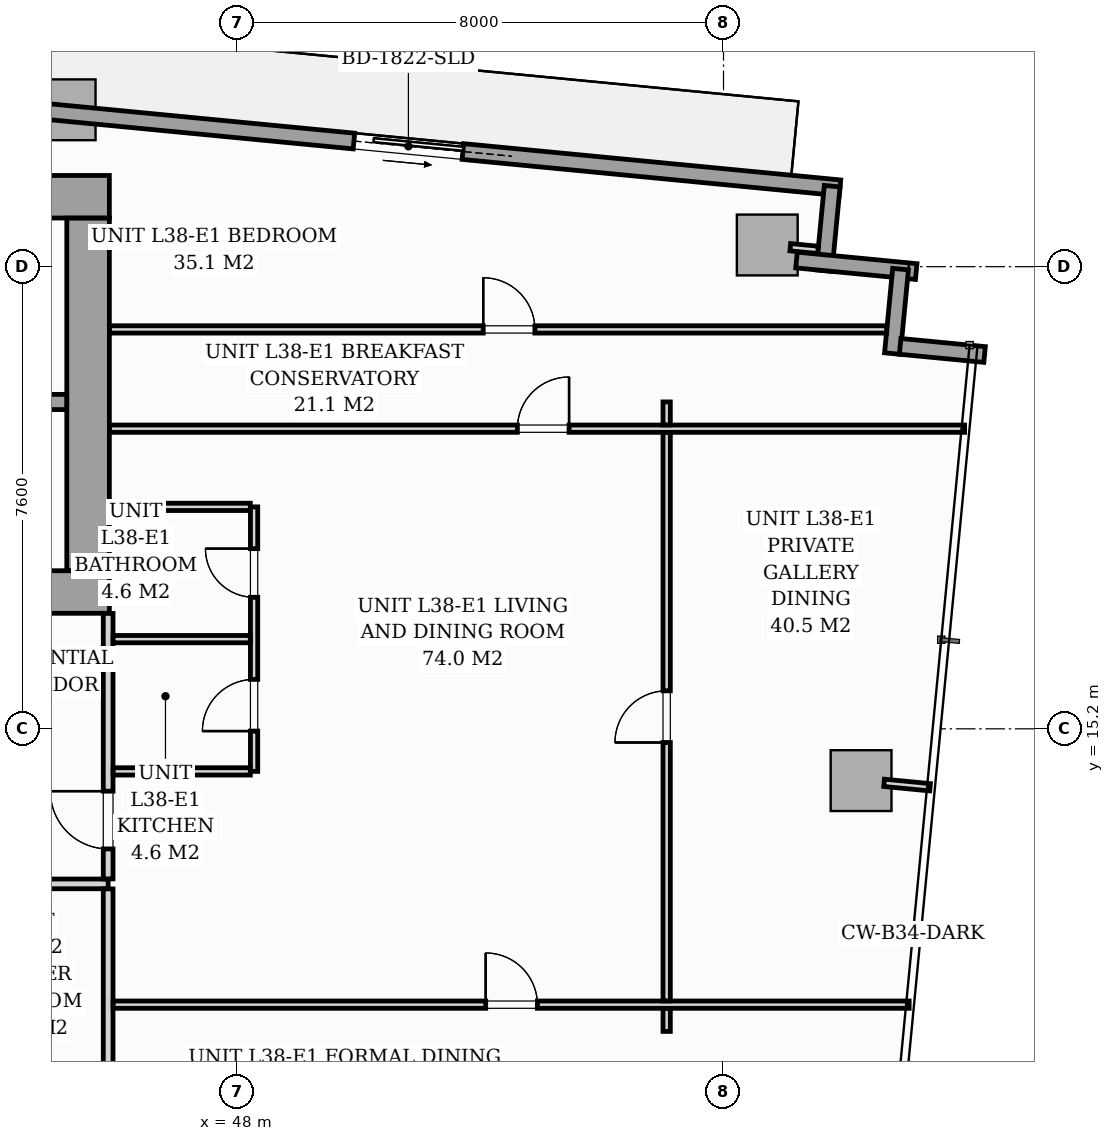
"""IFC4 building model, lengths in metres.
Left out: names, types, materials, properties, quantities, classifications, styles, units other than length and angle.
Written with IfcOpenShell. Run it as: python <this file> out.ifc"""

import sys

from ifc_helpers import new_model, si_unit, direction, frame, frame_2d, origin, origin_2d, place, context, subcontext, project, spatial, rectangle, i_section, extrude, source, transform, mapped, element, fill, save


model = new_model("IFC4")
c1 = context("Model", 3, precision=1e-05, world=origin(), true_north=direction((0.0, 1.0)))
c2 = subcontext(c1, "Body", "Model", "MODEL_VIEW")
j1 = project(units=[si_unit("LENGTHUNIT", "METRE"), si_unit("PLANEANGLEUNIT", "RADIAN")], contexts=[c1])
p1 = place(None, origin())
s1 = spatial("IfcSite", under=j1, at=p1, CompositionType="ELEMENT")
p2 = place(p1, origin())
s2 = spatial("IfcBuilding", under=s1, at=p2, CompositionType="ELEMENT")
p3 = place(p2, frame((0.0, 0.0, 134.2)))
s3 = spatial("IfcBuildingStorey", under=s2, at=p3, CompositionType="ELEMENT", Elevation=134.2)
m1 = source(origin(), c2, "Body", "SweptSolid", [
    extrude(i_section(OverallWidth=0.421, OverallDepth=0.465, WebThickness=0.045, FlangeThickness=0.073, FilletRadius=0.018, at=origin_2d()), origin(), (0.0, 0.0, 1.0), 3.196),
])
for number, where, z_axis, x_axis in (
    (1, (45.6, 17.4, 0.002), (0.0, 0.0, 1.0), (1.0, 0.0, 0.0)),
    (2, (45.6, 24.0, 0.002), (0.0, 0.0, 1.0), (1.0, 0.0, 0.0)),
):
    element("IfcColumn", number, at=place(p3, frame(where, z_axis=z_axis, x_axis=x_axis)), inside=s3, PredefinedType="PILASTER", context=c2, shape_type="MappedRepresentation", body=[
        mapped(m1, transform((0.0, 0.0, 0.0), scale=1.0)),
    ])
m2 = source(origin(), c2, "Body", "SweptSolid", [
    extrude(rectangle(XDim=1.0, YDim=1.0, at=origin_2d()), origin(), (0.0, 0.0, 1.0), 3.196),
])
for number, where, z_axis, x_axis in (
    (3, (45.173, 25.38, 0.002), (0.0, 0.0, 1.0), (0.995, -0.096, 0.0)),
    (4, (56.719, 23.157, 0.002), (0.0, 0.0, 1.0), (0.995, -0.096, 0.0)),
    (5, (58.262, 14.348, 0.002), (0.0, 0.0, 1.0), (0.995, -0.096, 0.0)),
):
    element("IfcColumn", number, at=place(p3, frame(where, z_axis=z_axis, x_axis=x_axis)), inside=s3, PredefinedType="COLUMN", context=c2, shape_type="MappedRepresentation", body=[
        mapped(m2, transform((0.0, 0.0, 0.0), scale=1.0)),
    ])
p4 = place(p3, frame((40.983, 25.727, 0.0), z_axis=(0.0, 0.0, 1.0), x_axis=(0.995395844771, -0.095849424686, 0.0)))
e6 = element("IfcWall", 6, at=p4, inside=s3, PredefinedType="STANDARD", context=c2, shape_type="SweptSolid", body=[
    extrude(rectangle(XDim=17.01, YDim=0.26, at=frame_2d((8.505, 0.0))), origin(), (0.0, 0.0, 1.0), 2.94),
])
p5 = place(p4, frame((8.98, 0.0, 0.0)))
e7 = element("IfcOpeningElement", 7, at=p5, cuts=e6, PredefinedType="OPENING", context=c2, shape_type="SweptSolid", body=[
    extrude(rectangle(XDim=1.8, YDim=2.06, at=frame_2d((0.9, 1.03))), frame((0.0, 0.14, 0.0), z_axis=(0.0, -1.0, 0.0), x_axis=(1.0, 0.0, 0.0)), (0.0, 0.0, 1.0), 0.28),
])
p6 = place(p4, frame((0.7, 0.0, 0.65)))
e8 = element("IfcOpeningElement", 8, at=p6, cuts=e6, PredefinedType="OPENING", context=c2, shape_type="SweptSolid", body=[
    extrude(rectangle(XDim=1.6, YDim=1.5, at=frame_2d((0.8, 0.75))), frame((0.0, 0.14, 0.0), z_axis=(0.0, -1.0, 0.0), x_axis=(1.0, 0.0, 0.0)), (0.0, 0.0, 1.0), 0.28),
])
p7 = place(p3, frame((57.787, 24.124, 0.0), z_axis=(0.0, 0.0, 1.0), x_axis=(-0.095915846097, -0.995389446633, 0.0)))
e9 = element("IfcWall", 9, at=p7, inside=s3, PredefinedType="STANDARD", context=c2, shape_type="SweptSolid", body=[
    extrude(rectangle(XDim=1.395, YDim=0.26, at=frame_2d((0.697, 0.0))), origin(), (0.0, 0.0, 1.0), 2.94),
])
p8 = place(p3, frame((57.2, 22.909, 0.0), z_axis=(0.0, 0.0, 1.0), x_axis=(0.995401789159, -0.095787672171, 0.0)))
e10 = element("IfcWall", 10, at=p8, inside=s3, PredefinedType="STANDARD", context=c2, shape_type="SweptSolid", body=[
    extrude(rectangle(XDim=1.978, YDim=0.26, at=frame_2d((0.989, 0.0))), origin(), (0.0, 0.0, 1.0), 2.94),
])
for number, where, z_axis, x_axis in (
    (11, (58.912, 22.76, 0.0), (0.0, 0.0, 1.0), (-0.096, -0.995, 0.0)),
    (12, (58.905, 21.49, 0.0), (0.0, 0.0, 1.0), (0.995, -0.096, 0.0)),
):
    element("IfcWall", number, at=place(p3, frame(where, z_axis=z_axis, x_axis=x_axis)), inside=s3, PredefinedType="STANDARD", context=c2, shape_type="SweptSolid", body=[
        extrude(rectangle(XDim=1.395, YDim=0.26, at=frame_2d((0.698, 0.0))), origin(), (0.0, 0.0, 1.0), 2.94),
    ])
p9 = place(p3, frame((26.1, 17.45, 0.0), z_axis=(0.0, 0.0, 1.0), x_axis=(1.0, 0.0, 0.0)))
e13 = element("IfcWall", 13, at=p9, inside=s3, PredefinedType="SHEAR", context=c2, shape_type="SweptSolid", body=[
    extrude(rectangle(XDim=19.8, YDim=0.7, at=frame_2d((9.9, 0.0))), origin(), (0.0, 0.0, 1.0), 3.2),
])
p10 = place(p9, frame((1.05, 0.0, 0.0)))
e14 = element("IfcOpeningElement", 14, at=p10, cuts=e13, PredefinedType="OPENING", context=c2, shape_type="SweptSolid", body=[
    extrude(rectangle(XDim=0.95, YDim=2.06, at=frame_2d((0.475, 1.03))), frame((0.0, 0.36, 0.0), z_axis=(0.0, -1.0, 0.0), x_axis=(1.0, 0.0, 0.0)), (0.0, 0.0, 1.0), 0.72),
])
p11 = place(p9, frame((9.48, 0.0, 0.0)))
e15 = element("IfcOpeningElement", 15, at=p11, cuts=e13, PredefinedType="OPENING", context=c2, shape_type="SweptSolid", body=[
    extrude(rectangle(XDim=0.85, YDim=2.0, at=frame_2d((0.425, 1.0))), frame((0.0, 0.36, 0.0), z_axis=(0.0, -1.0, 0.0), x_axis=(1.0, 0.0, 0.0)), (0.0, 0.0, 1.0), 0.72),
])
p12 = place(p9, frame((17.65, 0.0, 0.0)))
e16 = element("IfcOpeningElement", 16, at=p12, cuts=e13, PredefinedType="OPENING", context=c2, shape_type="SweptSolid", body=[
    extrude(rectangle(XDim=0.95, YDim=2.06, at=frame_2d((0.475, 1.03))), frame((0.0, 0.36, 0.0), z_axis=(0.0, -1.0, 0.0), x_axis=(1.0, 0.0, 0.0)), (0.0, 0.0, 1.0), 0.72),
])
p13 = place(p3, frame((26.1, 23.95, 0.0), z_axis=(0.0, 0.0, 1.0), x_axis=(1.0, 0.0, 0.0)))
e17 = element("IfcWall", 17, at=p13, inside=s3, PredefinedType="SHEAR", context=c2, shape_type="SweptSolid", body=[
    extrude(rectangle(XDim=19.8, YDim=0.7, at=frame_2d((9.9, 0.0))), origin(), (0.0, 0.0, 1.0), 3.2),
])
p14 = place(p3, frame((45.55, 17.802, 0.0), z_axis=(0.0, 0.0, 1.0), x_axis=(0.0, 1.0, 0.0)))
e18 = element("IfcWall", 18, at=p14, inside=s3, PredefinedType="SHEAR", context=c2, shape_type="SweptSolid", body=[
    extrude(rectangle(XDim=5.796, YDim=0.7, at=frame_2d((2.898, 0.0))), origin(), (0.0, 0.0, 1.0), 3.2),
])
p15 = place(p3, frame((37.05, 20.575, 0.0), z_axis=(0.0, 0.0, 1.0), x_axis=(1.0, 0.0, 0.0)))
e19 = element("IfcWall", 19, at=p15, inside=s3, PredefinedType="SOLIDWALL", context=c2, shape_type="SweptSolid", body=[
    extrude(rectangle(XDim=8.148, YDim=0.25, at=frame_2d((4.074, 0.0))), origin(), (0.0, 0.0, 1.0), 3.2),
])
p16 = place(p15, frame((6.6, 0.0, 0.0)))
e20 = element("IfcOpeningElement", 20, at=p16, cuts=e19, PredefinedType="OPENING", context=c2, shape_type="SweptSolid", body=[
    extrude(rectangle(XDim=0.95, YDim=2.06, at=frame_2d((0.475, 1.03))), frame((0.0, 0.135, 0.0), z_axis=(0.0, -1.0, 0.0), x_axis=(1.0, 0.0, 0.0)), (0.0, 0.0, 1.0), 0.27),
])
p17 = place(p3, frame((22.05, 12.65, 0.0), z_axis=(0.0, 0.0, 1.0), x_axis=(1.0, 0.0, 0.0)))
e21 = element("IfcWall", 21, at=p17, inside=s3, PredefinedType="PARTITIONING", context=c2, shape_type="SweptSolid", body=[
    extrude(rectangle(XDim=23.83, YDim=0.16, at=frame_2d((11.915, 0.0))), origin(), (0.0, 0.0, 1.0), 2.94),
])
p18 = place(p17, frame((3.0, 0.0, 0.0)))
e22 = element("IfcOpeningElement", 22, at=p18, cuts=e21, PredefinedType="OPENING", context=c2, shape_type="SweptSolid", body=[
    extrude(rectangle(XDim=0.95, YDim=2.06, at=frame_2d((0.475, 1.03))), frame((0.0, 0.09, 0.0), z_axis=(0.0, -1.0, 0.0), x_axis=(1.0, 0.0, 0.0)), (0.0, 0.0, 1.0), 0.18),
])
p19 = place(p17, frame((15.485, 0.0, 0.0)))
e23 = element("IfcOpeningElement", 23, at=p19, cuts=e21, PredefinedType="OPENING", context=c2, shape_type="SweptSolid", body=[
    extrude(rectangle(XDim=0.95, YDim=2.06, at=frame_2d((0.475, 1.03))), frame((0.0, 0.09, 0.0), z_axis=(0.0, -1.0, 0.0), x_axis=(1.0, 0.0, 0.0)), (0.0, 0.0, 1.0), 0.18),
])
p20 = place(p3, frame((45.88, 5.958, 0.0), z_axis=(0.0, 0.0, 1.0), x_axis=(0.0, 1.0, 0.0)))
e24 = element("IfcWall", 24, at=p20, inside=s3, PredefinedType="PARTITIONING", context=c2, shape_type="SweptSolid", body=[
    extrude(rectangle(XDim=6.61, YDim=0.16, at=frame_2d((3.305, 0.0))), origin(), (0.0, 0.0, 1.0), 2.94),
])
p21 = place(p3, frame((45.88, 12.732, 0.0), z_axis=(0.0, 0.0, 1.0), x_axis=(0.0, 1.0, 0.0)))
e25 = element("IfcWall", 25, at=p21, inside=s3, PredefinedType="PARTITIONING", context=c2, shape_type="SweptSolid", body=[
    extrude(rectangle(XDim=4.366, YDim=0.16, at=frame_2d((2.183, 0.0))), origin(), (0.0, 0.0, 1.0), 2.94),
])
p22 = place(p21, frame((0.493, 0.0, 0.0)))
e26 = element("IfcOpeningElement", 26, at=p22, cuts=e25, PredefinedType="OPENING", context=c2, shape_type="SweptSolid", body=[
    extrude(rectangle(XDim=0.95, YDim=2.06, at=frame_2d((0.475, 1.03))), frame((0.0, 0.09, 0.0), z_axis=(0.0, -1.0, 0.0), x_axis=(1.0, 0.0, 0.0)), (0.0, 0.0, 1.0), 0.18),
])
p23 = place(p3, frame((48.28, 14.5, 0.0), z_axis=(0.0, 0.0, 1.0), x_axis=(0.0, 1.0, 0.0)))
e27 = element("IfcWall", 27, at=p23, inside=s3, PredefinedType="PARTITIONING", context=c2, shape_type="SweptSolid", body=[
    extrude(rectangle(XDim=4.35, YDim=0.12, at=frame_2d((2.175, 0.0))), origin(), (0.0, 0.0, 1.0), 2.94),
])
p24 = place(p23, frame((0.663, 0.0, 0.0)))
e28 = element("IfcOpeningElement", 28, at=p24, cuts=e27, PredefinedType="OPENING", context=c2, shape_type="SweptSolid", body=[
    extrude(rectangle(XDim=0.85, YDim=2.05, at=frame_2d((0.425, 1.025))), frame((0.0, 0.07, 0.0), z_axis=(0.0, -1.0, 0.0), x_axis=(1.0, 0.0, 0.0)), (0.0, 0.0, 1.0), 0.14),
])
p25 = place(p23, frame((2.863, 0.0, 0.0)))
e29 = element("IfcOpeningElement", 29, at=p25, cuts=e27, PredefinedType="OPENING", context=c2, shape_type="SweptSolid", body=[
    extrude(rectangle(XDim=0.8, YDim=2.02, at=frame_2d((0.4, 1.01))), frame((0.0, 0.07, 0.0), z_axis=(0.0, -1.0, 0.0), x_axis=(1.0, 0.0, 0.0)), (0.0, 0.0, 1.0), 0.14),
])
p26 = place(p3, frame((45.962, 16.675, 0.0), z_axis=(0.0, 0.0, 1.0), x_axis=(1.0, 0.0, 0.0)))
e30 = element("IfcWall", 30, at=p26, inside=s3, PredefinedType="PARTITIONING", context=c2, shape_type="SweptSolid", body=[
    extrude(rectangle(XDim=2.256, YDim=0.12, at=frame_2d((1.128, 0.0))), origin(), (0.0, 0.0, 1.0), 2.063),
])
p27 = place(p3, frame((45.962, 14.5, 0.0), z_axis=(0.0, 0.0, 1.0), x_axis=(1.0, 0.0, 0.0)))
e31 = element("IfcWall", 31, at=p27, inside=s3, PredefinedType="PARTITIONING", context=c2, shape_type="SweptSolid", body=[
    extrude(rectangle(XDim=2.256, YDim=0.12, at=frame_2d((1.128, 0.0))), origin(), (0.0, 0.0, 1.0), 2.94),
])
p28 = place(p3, frame((45.902, 18.85, 0.0), z_axis=(0.0, 0.0, 1.0), x_axis=(1.0, 0.0, 0.0)))
e32 = element("IfcWall", 32, at=p28, inside=s3, PredefinedType="PARTITIONING", context=c2, shape_type="SweptSolid", body=[
    extrude(rectangle(XDim=2.316, YDim=0.12, at=frame_2d((1.158, 0.0))), origin(), (0.0, 0.0, 1.0), 2.94),
])
p29 = place(p3, frame((45.902, 21.768, 0.0), z_axis=(0.0, 0.0, 1.0), x_axis=(1.0, 0.0, 0.0)))
e33 = element("IfcWall", 33, at=p29, inside=s3, PredefinedType="PARTITIONING", context=c2, shape_type="SweptSolid", body=[
    extrude(rectangle(XDim=12.781, YDim=0.12, at=frame_2d((6.391, 0.0))), origin(), (0.0, 0.0, 1.0), 2.94),
])
p30 = place(p29, frame((6.146, 0.0, 0.0)))
e34 = element("IfcOpeningElement", 34, at=p30, cuts=e33, PredefinedType="OPENING", context=c2, shape_type="SweptSolid", body=[
    extrude(rectangle(XDim=0.85, YDim=2.05, at=frame_2d((0.425, 1.025))), frame((0.0, 0.07, 0.0), z_axis=(0.0, -1.0, 0.0), x_axis=(1.0, 0.0, 0.0)), (0.0, 0.0, 1.0), 0.14),
])
p31 = place(p3, frame((45.962, 10.664, 0.0), z_axis=(0.0, 0.0, 1.0), x_axis=(1.0, 0.0, 0.0)))
e35 = element("IfcWall", 35, at=p31, inside=s3, PredefinedType="PARTITIONING", context=c2, shape_type="SweptSolid", body=[
    extrude(rectangle(XDim=13.091, YDim=0.12, at=frame_2d((6.545, 0.0))), origin(), (0.0, 0.0, 1.0), 2.94),
])
p32 = place(p31, frame((6.127, 0.0, 0.0)))
e36 = element("IfcOpeningElement", 36, at=p32, cuts=e35, PredefinedType="OPENING", context=c2, shape_type="SweptSolid", body=[
    extrude(rectangle(XDim=0.85, YDim=2.05, at=frame_2d((0.425, 1.025))), frame((0.0, 0.07, 0.0), z_axis=(0.0, -1.0, 0.0), x_axis=(1.0, 0.0, 0.0)), (0.0, 0.0, 1.0), 0.14),
])
p33 = place(p3, frame((45.902, 20.136, 0.0), z_axis=(0.0, 0.0, 1.0), x_axis=(1.0, 0.0, 0.0)))
e37 = element("IfcWall", 37, at=p33, inside=s3, PredefinedType="PARTITIONING", context=c2, shape_type="SweptSolid", body=[
    extrude(rectangle(XDim=14.063, YDim=0.12, at=frame_2d((7.031, 0.0))), origin(), (0.0, 0.0, 1.0), 2.94),
])
p34 = place(p33, frame((6.708, 0.0, 0.0)))
e38 = element("IfcOpeningElement", 38, at=p34, cuts=e37, PredefinedType="OPENING", context=c2, shape_type="SweptSolid", body=[
    extrude(rectangle(XDim=0.85, YDim=2.05, at=frame_2d((0.425, 1.025))), frame((0.0, 0.07, 0.0), z_axis=(0.0, -1.0, 0.0), x_axis=(1.0, 0.0, 0.0)), (0.0, 0.0, 1.0), 0.14),
])
p35 = place(p3, frame((55.065, 10.224, 0.0), z_axis=(0.0, 0.0, 1.0), x_axis=(0.0, 1.0, 0.0)))
e39 = element("IfcWall", 39, at=p35, inside=s3, PredefinedType="PARTITIONING", context=c2, shape_type="SweptSolid", body=[
    extrude(rectangle(XDim=0.378, YDim=0.12, at=frame_2d((0.189, 0.0))), origin(), (0.0, 0.0, 1.0), 2.94),
])
p36 = place(p3, frame((55.065, 10.726, 0.0), z_axis=(0.0, 0.0, 1.0), x_axis=(0.0, 1.0, 0.0)))
e40 = element("IfcWall", 40, at=p36, inside=s3, PredefinedType="PARTITIONING", context=c2, shape_type="SweptSolid", body=[
    extrude(rectangle(XDim=9.348, YDim=0.12, at=frame_2d((4.674, 0.0))), origin(), (0.0, 0.0, 1.0), 2.94),
])
p37 = place(p36, frame((4.249, 0.0, 0.0)))
e41 = element("IfcOpeningElement", 41, at=p37, cuts=e40, PredefinedType="OPENING", context=c2, shape_type="SweptSolid", body=[
    extrude(rectangle(XDim=0.85, YDim=2.05, at=frame_2d((0.425, 1.025))), frame((0.0, 0.07, 0.0), z_axis=(0.0, -1.0, 0.0), x_axis=(1.0, 0.0, 0.0)), (0.0, 0.0, 1.0), 0.14),
])
p38 = place(p3, frame((55.065, 20.198, 0.0), z_axis=(0.0, 0.0, 1.0), x_axis=(0.0, 1.0, 0.0)))
e42 = element("IfcWall", 42, at=p38, inside=s3, PredefinedType="PARTITIONING", context=c2, shape_type="SweptSolid", body=[
    extrude(rectangle(XDim=0.378, YDim=0.12, at=frame_2d((0.189, 0.0))), origin(), (0.0, 0.0, 1.0), 2.94),
])
p39 = place(p3, frame((57.098, 23.12, 0.0), z_axis=(0.0, 0.0, 1.0), x_axis=(0.995384576284, -0.09596637586, 0.0)))
e43 = element("IfcWall", 43, at=p39, inside=s3, PredefinedType="PARTITIONING", context=c2, shape_type="SweptSolid", body=[
    extrude(rectangle(XDim=0.458, YDim=0.12, at=frame_2d((0.229, 0.0))), origin(), (0.0, 0.0, 1.0), 2.94),
])
p40 = place(p3, frame((58.64, 14.312, 0.0), z_axis=(0.0, 0.0, 1.0), x_axis=(0.995377786728, -0.096036772582, 0.0)))
e44 = element("IfcWall", 44, at=p40, inside=s3, PredefinedType="PARTITIONING", context=c2, shape_type="SweptSolid", body=[
    extrude(rectangle(XDim=0.76, YDim=0.12, at=frame_2d((0.38, 0.0))), origin(), (0.0, 0.0, 1.0), 2.94),
])
m3 = source(origin(), c2, "Body", "SweptSolid", [
    extrude(rectangle(XDim=1.8, YDim=2.06, at=frame_2d((0.9, 1.03))), frame((0.0, 0.025, 0.0), z_axis=(0.0, -1.0, 0.0), x_axis=(1.0, 0.0, 0.0)), (0.0, 0.0, 1.0), 0.05),
])
p41 = place(p5, origin())
e45 = element("IfcDoor", 45, at=p41, inside=s3, OperationType="SLIDING_TO_RIGHT", PredefinedType="DOOR", context=c2, shape_type="MappedRepresentation", body=[
    mapped(m3, transform((0.0, 0.0, 0.0), scale=1.0)),
])
fill(e7, e45)
m4 = source(origin(), c2, "Body", "SweptSolid", [
    extrude(rectangle(XDim=0.95, YDim=2.06, at=frame_2d((0.475, 1.03))), frame((0.0, 0.025, 0.0), z_axis=(0.0, -1.0, 0.0), x_axis=(1.0, 0.0, 0.0)), (0.0, 0.0, 1.0), 0.05),
])
p42 = place(p22, origin())
e46 = element("IfcDoor", 46, at=p42, inside=s3, OperationType="SINGLE_SWING_RIGHT", PredefinedType="DOOR", context=c2, shape_type="MappedRepresentation", body=[
    mapped(m4, transform((0.0, 0.0, 0.0), scale=1.0)),
])
fill(e26, e46)
m5 = source(origin(), c2, "Body", "SweptSolid", [
    extrude(rectangle(XDim=0.85, YDim=2.05, at=frame_2d((0.425, 1.025))), frame((0.0, 0.025, 0.0), z_axis=(0.0, -1.0, 0.0), x_axis=(1.0, 0.0, 0.0)), (0.0, 0.0, 1.0), 0.05),
])
p43 = place(p24, origin())
e47 = element("IfcDoor", 47, at=p43, inside=s3, OperationType="SINGLE_SWING_LEFT", PredefinedType="DOOR", context=c2, shape_type="MappedRepresentation", body=[
    mapped(m5, transform((0.0, 0.0, 0.0), scale=1.0)),
])
fill(e28, e47)
m6 = source(origin(), c2, "Body", "SweptSolid", [
    extrude(rectangle(XDim=0.8, YDim=2.02, at=frame_2d((0.4, 1.01))), frame((0.0, 0.025, 0.0), z_axis=(0.0, -1.0, 0.0), x_axis=(1.0, 0.0, 0.0)), (0.0, 0.0, 1.0), 0.05),
])
p44 = place(p25, origin())
e48 = element("IfcDoor", 48, at=p44, inside=s3, OperationType="SINGLE_SWING_RIGHT", PredefinedType="DOOR", context=c2, shape_type="MappedRepresentation", body=[
    mapped(m6, transform((0.0, 0.0, 0.0), scale=1.0)),
])
fill(e29, e48)
p45 = place(p30, origin())
e49 = element("IfcDoor", 49, at=p45, inside=s3, OperationType="SINGLE_SWING_LEFT", PredefinedType="DOOR", context=c2, shape_type="MappedRepresentation", body=[
    mapped(m5, transform((0.0, 0.0, 0.0), scale=1.0)),
])
fill(e34, e49)
p46 = place(p32, origin())
e50 = element("IfcDoor", 50, at=p46, inside=s3, OperationType="SINGLE_SWING_LEFT", PredefinedType="DOOR", context=c2, shape_type="MappedRepresentation", body=[
    mapped(m5, transform((0.0, 0.0, 0.0), scale=1.0)),
])
fill(e36, e50)
p47 = place(p34, origin())
e51 = element("IfcDoor", 51, at=p47, inside=s3, OperationType="SINGLE_SWING_RIGHT", PredefinedType="DOOR", context=c2, shape_type="MappedRepresentation", body=[
    mapped(m5, transform((0.0, 0.0, 0.0), scale=1.0)),
])
fill(e38, e51)
p48 = place(p37, origin())
e52 = element("IfcDoor", 52, at=p48, inside=s3, OperationType="SINGLE_SWING_LEFT", PredefinedType="DOOR", context=c2, shape_type="MappedRepresentation", body=[
    mapped(m5, transform((0.0, 0.0, 0.0), scale=1.0)),
])
fill(e41, e52)
save(model, sys.argv[1])
